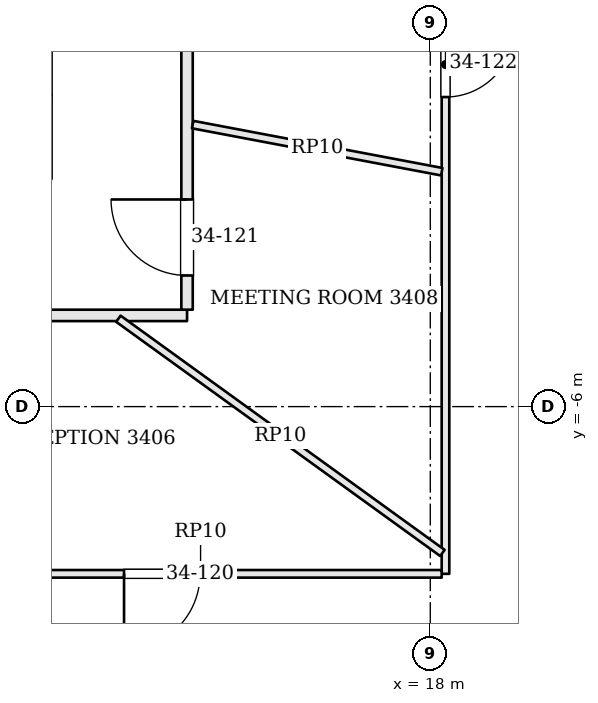
"""IFC4 building model, lengths in metres.
Left out: names, types, materials, properties, quantities, classifications, styles, units other than length and angle.
Written with IfcOpenShell. Run it as: python <this file> out.ifc"""

import sys

from ifc_helpers import new_model, si_unit, direction, frame, frame_2d, origin, place, context, subcontext, project, spatial, rectangle, extrude, element, fill, save


model = new_model("IFC4")
c1 = context("Model", 3, precision=1e-05, world=origin(), true_north=direction((0.0, 1.0)))
c2 = subcontext(c1, "Body", "Model", "MODEL_VIEW")
j1 = project(units=[si_unit("LENGTHUNIT", "METRE"), si_unit("PLANEANGLEUNIT", "RADIAN")], contexts=[c1])
p1 = place(None, origin())
s1 = spatial("IfcSite", under=j1, at=p1, CompositionType="ELEMENT")
p2 = place(p1, origin())
s2 = spatial("IfcBuilding", under=s1, at=p2, CompositionType="ELEMENT")
p3 = place(p2, frame((0.0, 0.0, 142.2)))
s3 = spatial("IfcBuildingStorey", under=s2, at=p3, CompositionType="ELEMENT", Elevation=142.2)
p4 = place(p3, frame((15.244, -14.841, 0.0), z_axis=(0.0, 0.0, 1.0), x_axis=(-0.46213645011, 0.88680883029, 0.0)))
e1 = element("IfcWall", 1, at=p4, inside=s3, PredefinedType="PARTITIONING", context=c2, shape_type="SweptSolid", body=[
    extrude(rectangle(XDim=11.248, YDim=0.15, at=frame_2d((5.624, 0.0))), origin(), (0.0, 0.0, 1.0), 3.198),
])
p5 = place(p3, frame((10.086, -4.8, 0.0), z_axis=(0.0, 0.0, 1.0), x_axis=(1.0, 0.0, 0.0)))
e2 = element("IfcWall", 2, at=p5, inside=s3, PredefinedType="PARTITIONING", context=c2, shape_type="SweptSolid", body=[
    extrude(rectangle(XDim=4.714, YDim=0.15, at=frame_2d((2.357, 0.0))), origin(), (0.0, 0.0, 1.0), 3.198),
])
p6 = place(p5, frame((1.337, 0.0, 0.0)))
e3 = element("IfcOpeningElement", 3, at=p6, cuts=e2, PredefinedType="OPENING", context=c2, shape_type="SweptSolid", body=[
    extrude(rectangle(XDim=1.0, YDim=2.1, at=frame_2d((0.5, 1.05))), frame((0.0, 0.085, 0.0), z_axis=(0.0, -1.0, 0.0), x_axis=(1.0, 0.0, 0.0)), (0.0, 0.0, 1.0), 0.17),
])
p7 = place(p3, frame((14.8, -4.725, 0.0), z_axis=(0.0, 0.0, 1.0), x_axis=(0.0, 1.0, 0.0)))
e4 = element("IfcWall", 4, at=p7, inside=s3, PredefinedType="PARTITIONING", context=c2, shape_type="SweptSolid", body=[
    extrude(rectangle(XDim=8.434, YDim=0.15, at=frame_2d((4.217, 0.0))), origin(), (0.0, 0.0, 1.0), 3.198),
])
p8 = place(p7, frame((0.45, 0.0, 0.0)))
e5 = element("IfcOpeningElement", 5, at=p8, cuts=e4, PredefinedType="OPENING", context=c2, shape_type="SweptSolid", body=[
    extrude(rectangle(XDim=1.0, YDim=2.4, at=frame_2d((0.5, 1.2))), frame((0.0, 0.085, 0.0), z_axis=(0.0, -1.0, 0.0), x_axis=(1.0, 0.0, 0.0)), (0.0, 0.0, 1.0), 0.17),
])
p9 = place(p3, frame((18.2, 5.199, 0.0), z_axis=(0.0, 0.0, 1.0), x_axis=(0.0, -1.0, 0.0)))
e6 = element("IfcWall", 6, at=p9, inside=s3, PredefinedType="PARTITIONING", context=c2, shape_type="SweptSolid", body=[
    extrude(rectangle(XDim=13.399, YDim=0.1, at=frame_2d((6.7, 0.0))), origin(), (0.0, 0.0, 1.0), 3.184),
])
p10 = place(p9, frame((6.227, 0.0, 0.0)))
e7 = element("IfcOpeningElement", 7, at=p10, cuts=e6, PredefinedType="OPENING", context=c2, shape_type="SweptSolid", body=[
    extrude(rectangle(XDim=0.9, YDim=2.1, at=frame_2d((0.45, 1.05))), frame((0.0, 0.06, 0.0), z_axis=(0.0, -1.0, 0.0), x_axis=(1.0, 0.0, 0.0)), (0.0, 0.0, 1.0), 0.12),
])
p11 = place(p9, frame((2.007, 0.0, 0.0)))
e8 = element("IfcOpeningElement", 8, at=p11, cuts=e6, PredefinedType="OPENING", context=c2, shape_type="SweptSolid", body=[
    extrude(rectangle(XDim=0.9, YDim=2.1, at=frame_2d((0.45, 1.05))), frame((0.0, 0.06, 0.0), z_axis=(0.0, -1.0, 0.0), x_axis=(1.0, 0.0, 0.0)), (0.0, 0.0, 1.0), 0.12),
])
p12 = place(p3, frame((18.15, -8.2, 0.0), z_axis=(0.0, 0.0, 1.0), x_axis=(-1.0, 0.0, 0.0)))
e9 = element("IfcWall", 9, at=p12, inside=s3, PredefinedType="PARTITIONING", context=c2, shape_type="SweptSolid", body=[
    extrude(rectangle(XDim=6.344, YDim=0.1, at=frame_2d((3.172, 0.0))), origin(), (0.0, 0.0, 1.0), 3.184),
])
p13 = place(p12, frame((3.179, 0.0, 0.0)))
e10 = element("IfcOpeningElement", 10, at=p13, cuts=e9, PredefinedType="OPENING", context=c2, shape_type="SweptSolid", body=[
    extrude(rectangle(XDim=1.0, YDim=2.1, at=frame_2d((0.5, 1.05))), frame((0.0, 0.06, 0.0), z_axis=(0.0, -1.0, 0.0), x_axis=(1.0, 0.0, 0.0)), (0.0, 0.0, 1.0), 0.12),
])
p14 = place(p3, frame((13.896, -4.844, 0.0), z_axis=(0.0, 0.0, 1.0), x_axis=(0.810468668719, -0.585781987624, 0.0)))
e11 = element("IfcWall", 11, at=p14, inside=s3, PredefinedType="PARTITIONING", context=c2, shape_type="SweptSolid", body=[
    extrude(rectangle(XDim=5.26, YDim=0.1, at=frame_2d((2.63, 0.0))), origin(), (0.0, 0.0, 1.0), 3.184),
])
p15 = place(p3, frame((14.874, -2.29, 0.0), z_axis=(0.0, 0.0, 1.0), x_axis=(0.982563379302, -0.185927958238, 0.0)))
e12 = element("IfcWall", 12, at=p15, inside=s3, PredefinedType="PARTITIONING", context=c2, shape_type="SweptSolid", body=[
    extrude(rectangle(XDim=3.335, YDim=0.1, at=frame_2d((1.667, 0.0))), origin(), (0.0, 0.0, 1.0), 3.184),
])
p16 = place(p13, origin())
e13 = element("IfcDoor", 13, at=p16, inside=s3, OperationType="SINGLE_SWING_RIGHT", PredefinedType="DOOR", context=c2, shape_type="SweptSolid", body=[
    extrude(rectangle(XDim=1.0, YDim=2.1, at=frame_2d((0.5, 1.05))), frame((0.0, 0.025, 0.0), z_axis=(0.0, -1.0, 0.0), x_axis=(1.0, 0.0, 0.0)), (0.0, 0.0, 1.0), 0.05),
])
fill(e10, e13)
p17 = place(p8, origin())
e14 = element("IfcDoor", 14, at=p17, inside=s3, OperationType="SINGLE_SWING_RIGHT", PredefinedType="DOOR", context=c2, shape_type="SweptSolid", body=[
    extrude(rectangle(XDim=1.0, YDim=2.4, at=frame_2d((0.5, 1.2))), frame((0.0, 0.025, 0.0), z_axis=(0.0, -1.0, 0.0), x_axis=(1.0, 0.0, 0.0)), (0.0, 0.0, 1.0), 0.05),
])
fill(e5, e14)
p18 = place(p10, origin())
e15 = element("IfcDoor", 15, at=p18, inside=s3, OperationType="SINGLE_SWING_LEFT", PredefinedType="DOOR", context=c2, shape_type="SweptSolid", body=[
    extrude(rectangle(XDim=0.9, YDim=2.1, at=frame_2d((0.45, 1.05))), frame((0.0, 0.025, 0.0), z_axis=(0.0, -1.0, 0.0), x_axis=(1.0, 0.0, 0.0)), (0.0, 0.0, 1.0), 0.05),
])
fill(e7, e15)
save(model, sys.argv[1])
